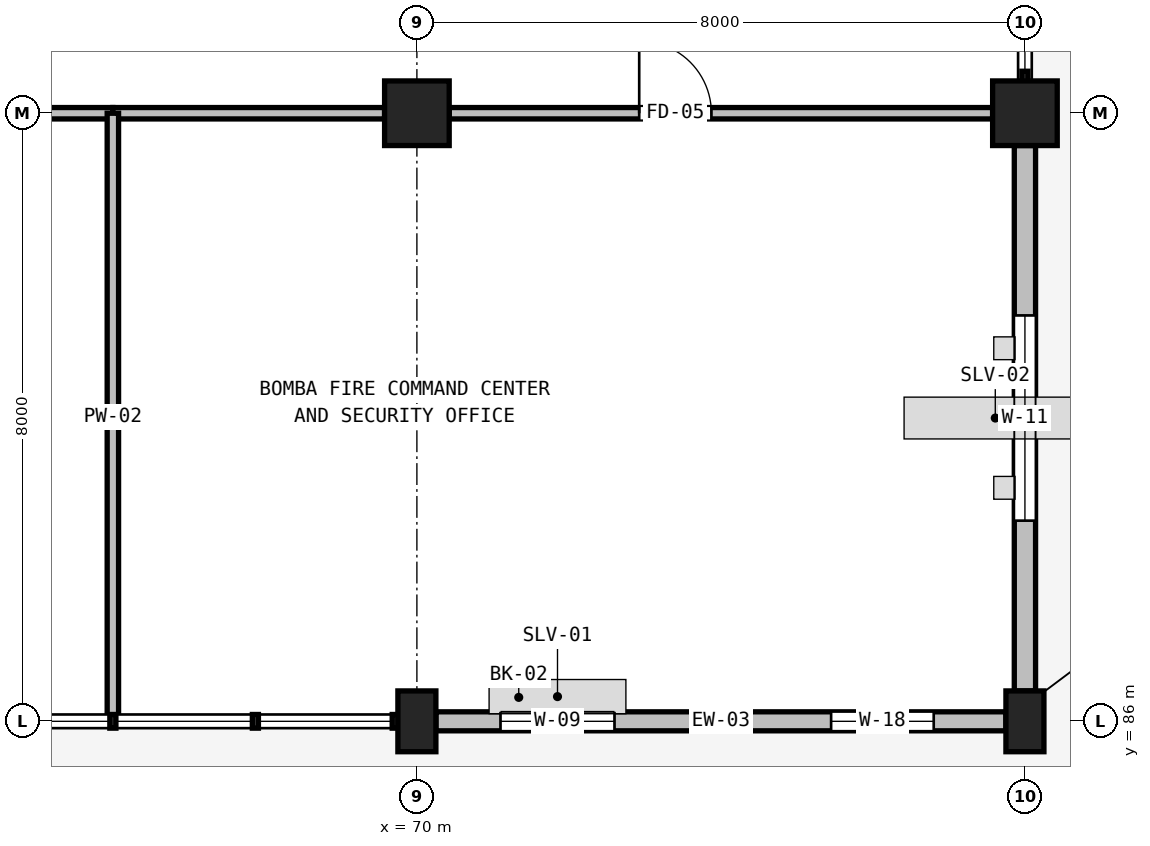
"""IFC4 building model, lengths in metres.
Left out: names, types, materials, properties, quantities, classifications, styles, units other than length and angle.
Written with IfcOpenShell. Run it as: python <this file> out.ifc"""

import sys

from ifc_helpers import new_model, si_unit, direction, frame, frame_2d, origin, origin_2d, place, context, subcontext, project, spatial, rectangle, extrude, element, fill, save


model = new_model("IFC4")
c1 = context("Model", 3, precision=1e-05, world=origin(), true_north=direction((0.0, 1.0)))
c2 = subcontext(c1, "Body", "Model", "MODEL_VIEW")
j1 = project(units=[si_unit("LENGTHUNIT", "METRE"), si_unit("PLANEANGLEUNIT", "RADIAN")], contexts=[c1])
p1 = place(None, origin())
s1 = spatial("IfcSite", under=j1, at=p1, CompositionType="ELEMENT")
p2 = place(p1, origin())
s2 = spatial("IfcBuilding", under=s1, at=p2, CompositionType="ELEMENT")
p3 = place(p2, origin())
s3 = spatial("IfcBuildingStorey", under=s2, at=p3, CompositionType="ELEMENT", Elevation=0.0)
p4 = place(p3, frame((70.0, 86.0, 0.0), z_axis=(0.0, 0.0, 1.0), x_axis=(1.0, 0.0, 0.0)))
e1 = element("IfcColumn", 1, at=p4, inside=s3, PredefinedType="COLUMN", context=c2, shape_type="SweptSolid", body=[
    extrude(rectangle(XDim=0.5, YDim=0.8, at=origin_2d()), origin(), (0.0, 0.0, 1.0), 5.4),
])
p5 = place(p3, frame((70.0, 94.0, 0.0), z_axis=(0.0, 0.0, 1.0), x_axis=(1.0, 0.0, 0.0)))
e2 = element("IfcColumn", 2, at=p5, inside=s3, PredefinedType="COLUMN", context=c2, shape_type="SweptSolid", body=[
    extrude(rectangle(XDim=0.85, YDim=0.85, at=origin_2d()), origin(), (0.0, 0.0, 1.0), 5.4),
])
p6 = place(p3, frame((78.0, 86.0, 0.0), z_axis=(0.0, 0.0, 1.0), x_axis=(1.0, 0.0, 0.0)))
e3 = element("IfcColumn", 3, at=p6, inside=s3, PredefinedType="COLUMN", context=c2, shape_type="SweptSolid", body=[
    extrude(rectangle(XDim=0.5, YDim=0.8, at=origin_2d()), origin(), (0.0, 0.0, 1.0), 5.4),
])
p7 = place(p3, frame((78.0, 94.0, 0.0), z_axis=(0.0, 0.0, 1.0), x_axis=(1.0, 0.0, 0.0)))
e4 = element("IfcColumn", 4, at=p7, inside=s3, PredefinedType="COLUMN", context=c2, shape_type="SweptSolid", body=[
    extrude(rectangle(XDim=0.85, YDim=0.85, at=origin_2d()), origin(), (0.0, 0.0, 1.0), 5.4),
])
p8 = place(p3, frame((70.25, 86.0, 0.0), z_axis=(0.0, 0.0, 1.0), x_axis=(1.0, 0.0, 0.0)))
e5 = element("IfcWall", 5, at=p8, inside=s3, PredefinedType="SOLIDWALL", context=c2, shape_type="SweptSolid", body=[
    extrude(rectangle(XDim=7.5, YDim=0.25, at=frame_2d((3.75, 0.0))), origin(), (0.0, 0.0, 1.0), 4.54),
])
p9 = place(p8, frame((0.85, 0.0, 1.2)))
e6 = element("IfcOpeningElement", 6, at=p9, cuts=e5, PredefinedType="OPENING", context=c2, shape_type="SweptSolid", body=[
    extrude(rectangle(XDim=1.5, YDim=1.5, at=frame_2d((0.75, 0.75))), frame((0.0, 0.135, 0.0), z_axis=(0.0, -1.0, 0.0), x_axis=(1.0, 0.0, 0.0)), (0.0, 0.0, 1.0), 0.27),
])
p10 = place(p8, frame((5.2, 0.0, 1.05)))
e7 = element("IfcOpeningElement", 7, at=p10, cuts=e5, PredefinedType="OPENING", context=c2, shape_type="SweptSolid", body=[
    extrude(rectangle(XDim=1.35, YDim=1.65, at=frame_2d((0.675, 0.825))), frame((0.0, 0.135, 0.0), z_axis=(0.0, -1.0, 0.0), x_axis=(1.0, 0.0, 0.0)), (0.0, 0.0, 1.0), 0.27),
])
p11 = place(p3, frame((78.0, 86.4, 0.0), z_axis=(0.0, 0.0, 1.0), x_axis=(0.0, 1.0, 0.0)))
e8 = element("IfcWall", 8, at=p11, inside=s3, PredefinedType="SOLIDWALL", context=c2, shape_type="SweptSolid", body=[
    extrude(rectangle(XDim=7.175, YDim=0.28, at=frame_2d((3.587, 0.0))), origin(), (0.0, 0.0, 1.0), 4.44),
])
p12 = place(p11, frame((2.24, 0.0, 0.9)))
e9 = element("IfcOpeningElement", 9, at=p12, cuts=e8, PredefinedType="OPENING", context=c2, shape_type="SweptSolid", body=[
    extrude(rectangle(XDim=2.7, YDim=2.1, at=frame_2d((1.35, 1.05))), frame((0.0, 0.15, 0.0), z_axis=(0.0, -1.0, 0.0), x_axis=(1.0, 0.0, 0.0)), (0.0, 0.0, 1.0), 0.3),
])
p13 = place(p3, frame((62.425, 94.0, 0.0), z_axis=(0.0, 0.0, 1.0), x_axis=(1.0, 0.0, 0.0)))
e10 = element("IfcWall", 10, at=p13, inside=s3, PredefinedType="PARTITIONING", context=c2, shape_type="SweptSolid", body=[
    extrude(rectangle(XDim=3.575, YDim=0.15, at=frame_2d((1.788, 0.0))), origin(), (0.0, 0.0, 1.0), 4.42),
])
p14 = place(p13, frame((0.89, 0.0, 0.0)))
e11 = element("IfcOpeningElement", 11, at=p14, cuts=e10, PredefinedType="OPENING", context=c2, shape_type="SweptSolid", body=[
    extrude(rectangle(XDim=1.0, YDim=2.15, at=frame_2d((0.5, 1.075))), frame((0.0, 0.085, 0.0), z_axis=(0.0, -1.0, 0.0), x_axis=(1.0, 0.0, 0.0)), (0.0, 0.0, 1.0), 0.17),
])
p15 = place(p3, frame((66.0, 94.0, 0.0), z_axis=(0.0, 0.0, 1.0), x_axis=(1.0, 0.0, 0.0)))
e12 = element("IfcWall", 12, at=p15, inside=s3, PredefinedType="PARTITIONING", context=c2, shape_type="SweptSolid", body=[
    extrude(rectangle(XDim=3.575, YDim=0.15, at=frame_2d((1.788, 0.0))), origin(), (0.0, 0.0, 1.0), 4.42),
])
p16 = place(p3, frame((70.425, 94.0, 0.0), z_axis=(0.0, 0.0, 1.0), x_axis=(1.0, 0.0, 0.0)))
e13 = element("IfcWall", 13, at=p16, inside=s3, PredefinedType="PARTITIONING", context=c2, shape_type="SweptSolid", body=[
    extrude(rectangle(XDim=7.15, YDim=0.15, at=frame_2d((3.575, 0.0))), origin(), (0.0, 0.0, 1.0), 4.36),
])
p17 = place(p16, frame((2.5, 0.0, 0.0)))
e14 = element("IfcOpeningElement", 14, at=p17, cuts=e13, PredefinedType="OPENING", context=c2, shape_type="SweptSolid", body=[
    extrude(rectangle(XDim=0.95, YDim=2.15, at=frame_2d((0.475, 1.075))), frame((0.0, 0.085, 0.0), z_axis=(0.0, -1.0, 0.0), x_axis=(1.0, 0.0, 0.0)), (0.0, 0.0, 1.0), 0.17),
])
p18 = place(p3, frame((66.0, 86.0, 0.0), z_axis=(0.0, 0.0, 1.0), x_axis=(0.0, 1.0, 0.0)))
e15 = element("IfcWall", 15, at=p18, inside=s3, PredefinedType="PARTITIONING", context=c2, shape_type="SweptSolid", body=[
    extrude(rectangle(XDim=8.0, YDim=0.15, at=frame_2d((4.0, 0.0))), origin(), (0.0, 0.0, 1.0), 5.1),
])
p19 = place(p9, origin())
e16 = element("IfcWindow", 16, at=p19, inside=s3, PartitioningType="SINGLE_PANEL", PredefinedType="WINDOW", context=c2, shape_type="SweptSolid", body=[
    extrude(rectangle(XDim=1.5, YDim=1.5, at=frame_2d((0.75, 0.75))), frame((0.0, 0.03, 0.0), z_axis=(0.0, -1.0, 0.0), x_axis=(1.0, 0.0, 0.0)), (0.0, 0.0, 1.0), 0.06),
])
fill(e6, e16)
p20 = place(p10, origin())
e17 = element("IfcWindow", 17, at=p20, inside=s3, PartitioningType="SINGLE_PANEL", PredefinedType="WINDOW", context=c2, shape_type="SweptSolid", body=[
    extrude(rectangle(XDim=1.35, YDim=1.65, at=frame_2d((0.675, 0.825))), frame((0.0, 0.03, 0.0), z_axis=(0.0, -1.0, 0.0), x_axis=(1.0, 0.0, 0.0)), (0.0, 0.0, 1.0), 0.06),
])
fill(e7, e17)
p21 = place(p12, origin())
e18 = element("IfcWindow", 18, at=p21, inside=s3, PartitioningType="SINGLE_PANEL", PredefinedType="WINDOW", context=c2, shape_type="SweptSolid", body=[
    extrude(rectangle(XDim=2.7, YDim=2.1, at=frame_2d((1.35, 1.05))), frame((0.0, 0.03, 0.0), z_axis=(0.0, -1.0, 0.0), x_axis=(1.0, 0.0, 0.0)), (0.0, 0.0, 1.0), 0.06),
])
fill(e9, e18)
p22 = place(p17, origin())
e19 = element("IfcDoor", 19, at=p22, inside=s3, OperationType="SINGLE_SWING_LEFT", PredefinedType="DOOR", context=c2, shape_type="SweptSolid", body=[
    extrude(rectangle(XDim=0.95, YDim=2.15, at=frame_2d((0.475, 1.075))), frame((0.0, 0.025, 0.0), z_axis=(0.0, -1.0, 0.0), x_axis=(1.0, 0.0, 0.0)), (0.0, 0.0, 1.0), 0.05),
])
fill(e14, e19)
save(model, sys.argv[1])
